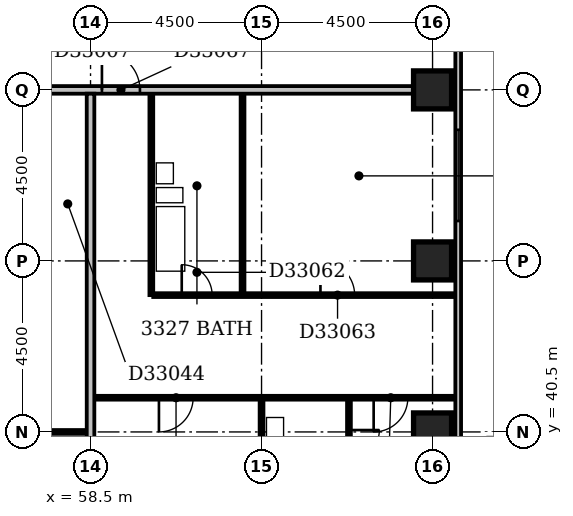
"""IFC4 building model, lengths in metres.
Left out: names, types, materials, properties, quantities, classifications, styles, units other than length and angle.
Written with IfcOpenShell. Run it as: python <this file> out.ifc"""

import sys

from ifc_helpers import new_model, si_unit, direction, frame, frame_2d, origin, origin_2d, place, context, subcontext, project, spatial, rectangle, extrude, element, fill, save


model = new_model("IFC4")
c1 = context("Model", 3, precision=1e-05, world=origin(), true_north=direction((0.0, 1.0)))
c2 = subcontext(c1, "Body", "Model", "MODEL_VIEW")
j1 = project(units=[si_unit("LENGTHUNIT", "METRE"), si_unit("PLANEANGLEUNIT", "RADIAN")], contexts=[c1])
p1 = place(None, origin())
s1 = spatial("IfcSite", under=j1, at=p1, CompositionType="ELEMENT")
p2 = place(p1, origin())
s2 = spatial("IfcBuilding", under=s1, at=p2, CompositionType="ELEMENT")
p3 = place(p2, frame((0.0, 0.0, 134.0)))
s3 = spatial("IfcBuildingStorey", under=s2, at=p3, CompositionType="ELEMENT", Elevation=134.0)
for number, where, z_axis, x_axis in (
    (1, (67.5, 40.5, -0.3), (0.0, 0.0, 1.0), (1.0, 0.0, 0.0)),
    (2, (67.5, 45.0, -0.3), (0.0, 0.0, 1.0), (1.0, 0.0, 0.0)),
    (3, (67.5, 49.5, -0.3), (0.0, 0.0, 1.0), (1.0, 0.0, 0.0)),
):
    element("IfcColumn", number, at=place(p3, frame(where, z_axis=z_axis, x_axis=x_axis)), inside=s3, PredefinedType="COLUMN", context=c2, shape_type="SweptSolid", body=[
        extrude(rectangle(XDim=1.0, YDim=1.0, at=origin_2d()), origin(), (0.0, 0.0, 1.0), 3.6),
    ])
p4 = place(p3, frame((68.175, 35.4, 0.0), z_axis=(0.0, 0.0, 1.0), x_axis=(0.0, 1.0, 0.0)))
e4 = element("IfcWall", 4, at=p4, inside=s3, PredefinedType="STANDARD", context=c2, shape_type="SweptSolid", body=[
    extrude(rectangle(XDim=23.85, YDim=0.15, at=frame_2d((11.925, 0.0))), origin(), (0.0, 0.0, 1.0), 2.7),
])
p5 = place(p4, frame((1.354, 0.0, 0.6)))
e5 = element("IfcOpeningElement", 5, at=p5, cuts=e4, PredefinedType="OPENING", context=c2, shape_type="SweptSolid", body=[
    extrude(rectangle(XDim=1.5, YDim=1.8, at=frame_2d((0.75, 0.9))), frame((0.0, 0.087, 0.0), z_axis=(0.0, -1.0, 0.0), x_axis=(1.0, 0.0, 0.0)), (0.0, 0.0, 1.0), 0.174),
])
p6 = place(p4, frame((10.65, 0.0, 0.6)))
e6 = element("IfcOpeningElement", 6, at=p6, cuts=e4, PredefinedType="OPENING", context=c2, shape_type="SweptSolid", body=[
    extrude(rectangle(XDim=2.4, YDim=1.8, at=frame_2d((1.2, 0.9))), frame((0.0, 0.087, 0.0), z_axis=(0.0, -1.0, 0.0), x_axis=(1.0, 0.0, 0.0)), (0.0, 0.0, 1.0), 0.174),
])
p7 = place(p3, frame((58.5, 36.5, 0.0), z_axis=(0.0, 0.0, 1.0), x_axis=(0.0, 1.0, 0.0)))
e7 = element("IfcWall", 7, at=p7, inside=s3, PredefinedType="PARTITIONING", context=c2, shape_type="SweptSolid", body=[
    extrude(rectangle(XDim=12.9, YDim=0.2, at=frame_2d((6.45, 0.0))), origin(), (0.0, 0.0, 1.0), 3.3),
])
p8 = place(p3, frame((63.0, 36.5, 0.0), z_axis=(0.0, 0.0, 1.0), x_axis=(0.0, 1.0, 0.0)))
e8 = element("IfcWall", 8, at=p8, inside=s3, PredefinedType="PARTITIONING", context=c2, shape_type="SweptSolid", body=[
    extrude(rectangle(XDim=4.85, YDim=0.1, at=frame_2d((2.425, 0.0))), origin(), (0.0, 0.0, 1.0), 2.4),
])
p9 = place(p3, frame((65.3, 38.7, 0.0), z_axis=(0.0, 0.0, 1.0), x_axis=(0.0, 1.0, 0.0)))
e9 = element("IfcWall", 9, at=p9, inside=s3, PredefinedType="PLUMBINGWALL", context=c2, shape_type="SweptSolid", body=[
    extrude(rectangle(XDim=2.65, YDim=0.1, at=frame_2d((1.325, 0.0))), origin(), (0.0, 0.0, 1.0), 3.3),
])
p10 = place(p9, frame((1.05, 0.0, 0.0)))
e10 = element("IfcOpeningElement", 10, at=p10, cuts=e9, PredefinedType="OPENING", context=c2, shape_type="SweptSolid", body=[
    extrude(rectangle(XDim=0.8, YDim=2.1, at=frame_2d((0.4, 1.05))), frame((0.0, 0.062, 0.0), z_axis=(0.0, -1.0, 0.0), x_axis=(1.0, 0.0, 0.0)), (0.0, 0.0, 1.0), 0.124),
])
p11 = place(p3, frame((54.1, 40.5, 0.0), z_axis=(0.0, 0.0, 1.0), x_axis=(1.0, 0.0, 0.0)))
e11 = element("IfcWall", 11, at=p11, inside=s3, PredefinedType="PARTITIONING", context=c2, shape_type="SweptSolid", body=[
    extrude(rectangle(XDim=4.3, YDim=0.1, at=frame_2d((2.15, 0.0))), origin(), (0.0, 0.0, 1.0), 3.3),
])
p12 = place(p11, frame((1.7, 0.0, 0.0)))
e12 = element("IfcOpeningElement", 12, at=p12, cuts=e11, PredefinedType="OPENING", context=c2, shape_type="SweptSolid", body=[
    extrude(rectangle(XDim=0.9, YDim=2.1, at=frame_2d((0.45, 1.05))), frame((0.0, 0.062, 0.0), z_axis=(0.0, -1.0, 0.0), x_axis=(1.0, 0.0, 0.0)), (0.0, 0.0, 1.0), 0.124),
])
p13 = place(p3, frame((58.6, 41.4, 0.0), z_axis=(0.0, 0.0, 1.0), x_axis=(1.0, 0.0, 0.0)))
e13 = element("IfcWall", 13, at=p13, inside=s3, PredefinedType="PARTITIONING", context=c2, shape_type="SweptSolid", body=[
    extrude(rectangle(XDim=9.5, YDim=0.1, at=frame_2d((4.75, 0.0))), origin(), (0.0, 0.0, 1.0), 3.3),
])
p14 = place(p13, frame((1.7, 0.0, 0.0)))
e14 = element("IfcOpeningElement", 14, at=p14, cuts=e13, PredefinedType="OPENING", context=c2, shape_type="SweptSolid", body=[
    extrude(rectangle(XDim=0.9, YDim=2.1, at=frame_2d((0.45, 1.05))), frame((0.0, 0.062, 0.0), z_axis=(0.0, -1.0, 0.0), x_axis=(1.0, 0.0, 0.0)), (0.0, 0.0, 1.0), 0.124),
])
p15 = place(p13, frame((7.35, 0.0, 0.0)))
e15 = element("IfcOpeningElement", 15, at=p15, cuts=e13, PredefinedType="OPENING", context=c2, shape_type="SweptSolid", body=[
    extrude(rectangle(XDim=0.9, YDim=2.1, at=frame_2d((0.45, 1.05))), frame((0.0, 0.062, 0.0), z_axis=(0.0, -1.0, 0.0), x_axis=(1.0, 0.0, 0.0)), (0.0, 0.0, 1.0), 0.124),
])
p16 = place(p3, frame((60.1, 44.1, 0.0), z_axis=(0.0, 0.0, 1.0), x_axis=(0.0, 1.0, 0.0)))
e16 = element("IfcWall", 16, at=p16, inside=s3, PredefinedType="PLUMBINGWALL", context=c2, shape_type="SweptSolid", body=[
    extrude(rectangle(XDim=5.3, YDim=0.1, at=frame_2d((2.65, 0.0))), origin(), (0.0, 0.0, 1.0), 3.3),
])
p17 = place(p3, frame((60.15, 44.1, 0.0), z_axis=(0.0, 0.0, 1.0), x_axis=(1.0, 0.0, 0.0)))
e17 = element("IfcWall", 17, at=p17, inside=s3, PredefinedType="PARTITIONING", context=c2, shape_type="SweptSolid", body=[
    extrude(rectangle(XDim=7.95, YDim=0.1, at=frame_2d((3.975, 0.0))), origin(), (0.0, 0.0, 1.0), 3.3),
])
p18 = place(p17, frame((0.75, 0.0, 0.0)))
e18 = element("IfcOpeningElement", 18, at=p18, cuts=e17, PredefinedType="OPENING", context=c2, shape_type="SweptSolid", body=[
    extrude(rectangle(XDim=0.8, YDim=2.1, at=frame_2d((0.4, 1.05))), frame((0.0, 0.062, 0.0), z_axis=(0.0, -1.0, 0.0), x_axis=(1.0, 0.0, 0.0)), (0.0, 0.0, 1.0), 0.124),
])
p19 = place(p17, frame((4.4, 0.0, 0.0)))
e19 = element("IfcOpeningElement", 19, at=p19, cuts=e17, PredefinedType="OPENING", context=c2, shape_type="SweptSolid", body=[
    extrude(rectangle(XDim=0.9, YDim=2.1, at=frame_2d((0.45, 1.05))), frame((0.0, 0.062, 0.0), z_axis=(0.0, -1.0, 0.0), x_axis=(1.0, 0.0, 0.0)), (0.0, 0.0, 1.0), 0.124),
])
p20 = place(p3, frame((62.5, 44.15, 0.0), z_axis=(0.0, 0.0, 1.0), x_axis=(0.0, 1.0, 0.0)))
e20 = element("IfcWall", 20, at=p20, inside=s3, PredefinedType="PLUMBINGWALL", context=c2, shape_type="SweptSolid", body=[
    extrude(rectangle(XDim=5.25, YDim=0.1, at=frame_2d((2.625, 0.0))), origin(), (0.0, 0.0, 1.0), 2.4),
])
p21 = place(p3, frame((57.35, 49.5, 0.0), z_axis=(0.0, 0.0, 1.0), x_axis=(1.0, 0.0, 0.0)))
e21 = element("IfcWall", 21, at=p21, inside=s3, PredefinedType="PARTITIONING", context=c2, shape_type="SweptSolid", body=[
    extrude(rectangle(XDim=9.65, YDim=0.2, at=frame_2d((4.825, 0.0))), origin(), (0.0, 0.0, 1.0), 3.3),
])
p22 = place(p21, frame((1.45, 0.0, 0.0)))
e22 = element("IfcOpeningElement", 22, at=p22, cuts=e21, PredefinedType="OPENING", context=c2, shape_type="SweptSolid", body=[
    extrude(rectangle(XDim=1.0, YDim=2.1, at=frame_2d((0.5, 1.05))), frame((0.0, 0.112, 0.0), z_axis=(0.0, -1.0, 0.0), x_axis=(1.0, 0.0, 0.0)), (0.0, 0.0, 1.0), 0.224),
])
p23 = place(p6, origin())
e23 = element("IfcWindow", 23, at=p23, inside=s3, PartitioningType="SINGLE_PANEL", PredefinedType="WINDOW", context=c2, shape_type="SweptSolid", body=[
    extrude(rectangle(XDim=2.4, YDim=1.8, at=frame_2d((1.2, 0.9))), frame((0.0, 0.03, 0.0), z_axis=(0.0, -1.0, 0.0), x_axis=(1.0, 0.0, 0.0)), (0.0, 0.0, 1.0), 0.06),
])
fill(e6, e23)
p24 = place(p10, origin())
e24 = element("IfcDoor", 24, at=p24, inside=s3, OperationType="SINGLE_SWING_RIGHT", PredefinedType="DOOR", context=c2, shape_type="SweptSolid", body=[
    extrude(rectangle(XDim=0.8, YDim=2.1, at=frame_2d((0.4, 1.05))), frame((0.0, 0.025, 0.0), z_axis=(0.0, -1.0, 0.0), x_axis=(1.0, 0.0, 0.0)), (0.0, 0.0, 1.0), 0.05),
])
fill(e10, e24)
p25 = place(p14, frame((0.9, 0.0, 0.0), z_axis=(0.0, 0.0, 1.0), x_axis=(-1.0, 0.0, 0.0)))
e25 = element("IfcDoor", 25, at=p25, inside=s3, OperationType="SINGLE_SWING_RIGHT", PredefinedType="DOOR", context=c2, shape_type="SweptSolid", body=[
    extrude(rectangle(XDim=0.9, YDim=2.1, at=frame_2d((0.45, 1.05))), frame((0.0, 0.025, 0.0), z_axis=(0.0, -1.0, 0.0), x_axis=(1.0, 0.0, 0.0)), (0.0, 0.0, 1.0), 0.05),
])
fill(e14, e25)
p26 = place(p15, frame((0.9, 0.0, 0.0), z_axis=(0.0, 0.0, 1.0), x_axis=(-1.0, 0.0, 0.0)))
e26 = element("IfcDoor", 26, at=p26, inside=s3, OperationType="SINGLE_SWING_RIGHT", PredefinedType="DOOR", context=c2, shape_type="SweptSolid", body=[
    extrude(rectangle(XDim=0.9, YDim=2.1, at=frame_2d((0.45, 1.05))), frame((0.0, 0.025, 0.0), z_axis=(0.0, -1.0, 0.0), x_axis=(1.0, 0.0, 0.0)), (0.0, 0.0, 1.0), 0.05),
])
fill(e15, e26)
p27 = place(p18, origin())
e27 = element("IfcDoor", 27, at=p27, inside=s3, OperationType="SINGLE_SWING_LEFT", PredefinedType="DOOR", context=c2, shape_type="SweptSolid", body=[
    extrude(rectangle(XDim=0.8, YDim=2.1, at=frame_2d((0.4, 1.05))), frame((0.0, 0.025, 0.0), z_axis=(0.0, -1.0, 0.0), x_axis=(1.0, 0.0, 0.0)), (0.0, 0.0, 1.0), 0.05),
])
fill(e18, e27)
p28 = place(p19, origin())
e28 = element("IfcDoor", 28, at=p28, inside=s3, OperationType="SINGLE_SWING_LEFT", PredefinedType="DOOR", context=c2, shape_type="SweptSolid", body=[
    extrude(rectangle(XDim=0.9, YDim=2.1, at=frame_2d((0.45, 1.05))), frame((0.0, 0.025, 0.0), z_axis=(0.0, -1.0, 0.0), x_axis=(1.0, 0.0, 0.0)), (0.0, 0.0, 1.0), 0.05),
])
fill(e19, e28)
p29 = place(p22, origin())
e29 = element("IfcDoor", 29, at=p29, inside=s3, OperationType="SINGLE_SWING_LEFT", PredefinedType="DOOR", context=c2, shape_type="SweptSolid", body=[
    extrude(rectangle(XDim=1.0, YDim=2.1, at=frame_2d((0.5, 1.05))), frame((0.0, 0.025, 0.0), z_axis=(0.0, -1.0, 0.0), x_axis=(1.0, 0.0, 0.0)), (0.0, 0.0, 1.0), 0.05),
])
fill(e22, e29)
save(model, sys.argv[1])
